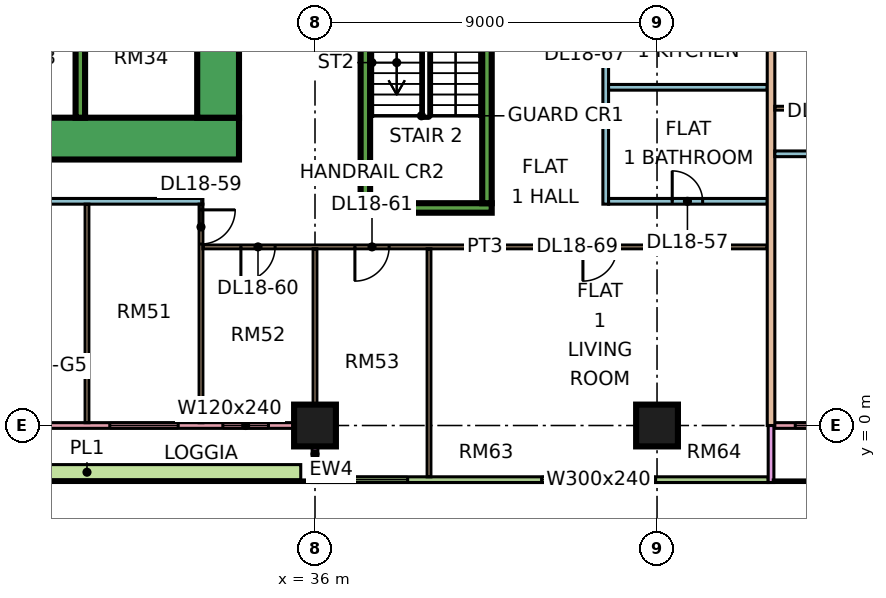
"""IFC4 building model, lengths in metres.
Left out: names, types, materials, properties, quantities, classifications, styles, units other than length and angle.
Written with IfcOpenShell. Run it as: python <this file> out.ifc"""

import sys

from ifc_helpers import new_model, si_unit, direction, frame, frame_2d, origin, origin_2d, place, context, subcontext, project, spatial, rectangle, extrude, element, fill, save


model = new_model("IFC4")
c1 = context("Model", 3, precision=1e-05, world=origin(), true_north=direction((0.0, 1.0)))
c2 = subcontext(c1, "Body", "Model", "MODEL_VIEW")
j1 = project(units=[si_unit("LENGTHUNIT", "METRE"), si_unit("PLANEANGLEUNIT", "RADIAN")], contexts=[c1])
p1 = place(None, origin())
s1 = spatial("IfcSite", under=j1, at=p1, CompositionType="ELEMENT")
p2 = place(p1, origin())
s2 = spatial("IfcBuilding", under=s1, at=p2, CompositionType="ELEMENT")
p3 = place(p2, frame((0.0, 0.0, 82.65)))
s3 = spatial("IfcBuildingStorey", under=s2, at=p3, CompositionType="ELEMENT", Elevation=82.65)
for number, where, z_axis, x_axis in (
    (1, (36.0, 0.0, 0.0), (0.0, 0.0, 1.0), (1.0, 0.0, 0.0)),
    (2, (45.0, 0.0, 0.0), (0.0, 0.0, 1.0), (1.0, 0.0, 0.0)),
):
    element("IfcColumn", number, at=place(p3, frame(where, z_axis=z_axis, x_axis=x_axis)), inside=s3, PredefinedType="COLUMN", context=c2, shape_type="SweptSolid", body=[
        extrude(rectangle(XDim=1.1, YDim=1.1, at=origin_2d()), origin(), (0.0, 0.0, 1.0), 3.75),
    ])
p4 = place(p3, frame((9.0, 7.55, 0.0), z_axis=(0.0, 0.0, 1.0), x_axis=(1.0, 0.0, 0.0)))
e3 = element("IfcWall", 3, at=p4, inside=s3, PredefinedType="SHEAR", context=c2, shape_type="SweptSolid", body=[
    extrude(rectangle(XDim=25.0, YDim=1.1, at=frame_2d((12.5, 0.0))), origin(), (0.0, 0.0, 1.0), 3.75),
])
p5 = place(p3, frame((33.45, 8.1, 0.0), z_axis=(0.0, 0.0, 1.0), x_axis=(0.0, 1.0, 0.0)))
e4 = element("IfcWall", 4, at=p5, inside=s3, PredefinedType="SHEAR", context=c2, shape_type="SweptSolid", body=[
    extrude(rectangle(XDim=10.8, YDim=1.1, at=frame_2d((5.4, 0.0))), origin(), (0.0, 0.0, 1.0), 3.75),
])
p6 = place(p5, frame((5.1, 0.0, 0.0)))
e5 = element("IfcOpeningElement", 5, at=p6, cuts=e4, PredefinedType="OPENING", context=c2, shape_type="SweptSolid", body=[
    extrude(rectangle(XDim=1.8, YDim=2.4, at=frame_2d((0.9, 1.2))), frame((0.0, 0.56, 0.0), z_axis=(0.0, -1.0, 0.0), x_axis=(1.0, 0.0, 0.0)), (0.0, 0.0, 1.0), 1.12),
])
p7 = place(p3, frame((29.825, 8.1, 0.0), z_axis=(0.0, 0.0, 1.0), x_axis=(0.0, 1.0, 0.0)))
e6 = element("IfcWall", 6, at=p7, inside=s3, PredefinedType="SHEAR", context=c2, shape_type="SweptSolid", body=[
    extrude(rectangle(XDim=3.1, YDim=0.25, at=frame_2d((1.55, 0.0))), origin(), (0.0, 0.0, 1.0), 3.75),
])
p8 = place(p3, frame((37.2, 5.725, 0.0), z_axis=(0.0, 0.0, 1.0), x_axis=(1.0, 0.0, 0.0)))
e7 = element("IfcWall", 7, at=p8, inside=s3, PredefinedType="SHEAR", context=c2, shape_type="SweptSolid", body=[
    extrude(rectangle(XDim=3.45, YDim=0.25, at=frame_2d((1.725, 0.0))), origin(), (0.0, 0.0, 1.0), 3.75),
])
for number, where, z_axis, x_axis in (
    (8, (37.325, 5.85, 0.0), (0.0, 0.0, 1.0), (0.0, 1.0, 0.0)),
    (9, (40.525, 5.85, 0.0), (0.0, 0.0, 1.0), (0.0, 1.0, 0.0)),
):
    element("IfcWall", number, at=place(p3, frame(where, z_axis=z_axis, x_axis=x_axis)), inside=s3, PredefinedType="SHEAR", context=c2, shape_type="SweptSolid", body=[
        extrude(rectangle(XDim=6.5, YDim=0.25, at=frame_2d((3.25, 0.0))), origin(), (0.0, 0.0, 1.0), 3.75),
    ])
p9 = place(p3, frame((24.075, 0.0, 0.0), z_axis=(0.0, 0.0, 1.0), x_axis=(1.0, 0.0, 0.0)))
e10 = element("IfcWall", 10, at=p9, inside=s3, PredefinedType="SOLIDWALL", context=c2, shape_type="SweptSolid", body=[
    extrude(rectangle(XDim=11.85, YDim=0.15, at=frame_2d((5.925, 0.0))), origin(), (0.0, 0.0, 1.0), 3.3),
])
p10 = place(p9, frame((2.35, 0.0, 0.0)))
e11 = element("IfcOpeningElement", 11, at=p10, cuts=e10, PredefinedType="OPENING", context=c2, shape_type="SweptSolid", body=[
    extrude(rectangle(XDim=1.8, YDim=2.4, at=frame_2d((0.9, 1.2))), frame((0.0, 0.085, 0.0), z_axis=(0.0, -1.0, 0.0), x_axis=(1.0, 0.0, 0.0)), (0.0, 0.0, 1.0), 0.17),
])
p11 = place(p9, frame((6.525, 0.0, 0.45)))
e12 = element("IfcOpeningElement", 12, at=p11, cuts=e10, PredefinedType="OPENING", context=c2, shape_type="SweptSolid", body=[
    extrude(rectangle(XDim=1.8, YDim=2.4, at=frame_2d((0.9, 1.2))), frame((0.0, 0.085, 0.0), z_axis=(0.0, -1.0, 0.0), x_axis=(1.0, 0.0, 0.0)), (0.0, 0.0, 1.0), 0.17),
])
p12 = place(p9, frame((9.5, 0.0, 0.45)))
e13 = element("IfcOpeningElement", 13, at=p12, cuts=e10, PredefinedType="OPENING", context=c2, shape_type="SweptSolid", body=[
    extrude(rectangle(XDim=1.2, YDim=2.4, at=frame_2d((0.6, 1.2))), frame((0.0, 0.085, 0.0), z_axis=(0.0, -1.0, 0.0), x_axis=(1.0, 0.0, 0.0)), (0.0, 0.0, 1.0), 0.17),
])
p13 = place(p3, frame((36.0, -1.5, 0.0), z_axis=(0.0, 0.0, 1.0), x_axis=(0.0, 1.0, 0.0)))
e14 = element("IfcWall", 14, at=p13, inside=s3, PredefinedType="SOLIDWALL", context=c2, shape_type="SweptSolid", body=[
    extrude(rectangle(XDim=1.5, YDim=0.15, at=frame_2d((0.75, 0.0))), origin(), (0.0, 0.0, 1.0), 3.3),
])
p14 = place(p3, frame((36.075, -1.425, 0.0), z_axis=(0.0, 0.0, 1.0), x_axis=(1.0, 0.0, 0.0)))
e15 = element("IfcWall", 15, at=p14, inside=s3, PredefinedType="SOLIDWALL", context=c2, shape_type="SweptSolid", body=[
    extrude(rectangle(XDim=11.85, YDim=0.15, at=frame_2d((5.925, 0.0))), origin(), (0.0, 0.0, 1.0), 3.3),
])
p15 = place(p14, frame((0.562, 0.0, 0.45)))
e16 = element("IfcOpeningElement", 16, at=p15, cuts=e15, PredefinedType="OPENING", context=c2, shape_type="SweptSolid", body=[
    extrude(rectangle(XDim=1.8, YDim=2.4, at=frame_2d((0.9, 1.2))), frame((0.0, 0.085, 0.0), z_axis=(0.0, -1.0, 0.0), x_axis=(1.0, 0.0, 0.0)), (0.0, 0.0, 1.0), 0.17),
])
p16 = place(p14, frame((5.887, 0.0, 0.45)))
e17 = element("IfcOpeningElement", 17, at=p16, cuts=e15, PredefinedType="OPENING", context=c2, shape_type="SweptSolid", body=[
    extrude(rectangle(XDim=3.0, YDim=2.4, at=frame_2d((1.5, 1.2))), frame((0.0, 0.085, 0.0), z_axis=(0.0, -1.0, 0.0), x_axis=(1.0, 0.0, 0.0)), (0.0, 0.0, 1.0), 0.17),
])
p17 = place(p3, frame((48.075, 0.0, 0.0), z_axis=(0.0, 0.0, 1.0), x_axis=(1.0, 0.0, 0.0)))
e18 = element("IfcWall", 18, at=p17, inside=s3, PredefinedType="SOLIDWALL", context=c2, shape_type="SweptSolid", body=[
    extrude(rectangle(XDim=11.85, YDim=0.15, at=frame_2d((5.925, 0.0))), origin(), (0.0, 0.0, 1.0), 3.3),
])
p18 = place(p17, frame((0.562, 0.0, 0.45)))
e19 = element("IfcOpeningElement", 19, at=p18, cuts=e18, PredefinedType="OPENING", context=c2, shape_type="SweptSolid", body=[
    extrude(rectangle(XDim=1.8, YDim=2.4, at=frame_2d((0.9, 1.2))), frame((0.0, 0.085, 0.0), z_axis=(0.0, -1.0, 0.0), x_axis=(1.0, 0.0, 0.0)), (0.0, 0.0, 1.0), 0.17),
])
p19 = place(p17, frame((3.5, 0.0, 0.45)))
e20 = element("IfcOpeningElement", 20, at=p19, cuts=e18, PredefinedType="OPENING", context=c2, shape_type="SweptSolid", body=[
    extrude(rectangle(XDim=1.2, YDim=2.4, at=frame_2d((0.6, 1.2))), frame((0.0, 0.085, 0.0), z_axis=(0.0, -1.0, 0.0), x_axis=(1.0, 0.0, 0.0)), (0.0, 0.0, 1.0), 0.17),
])
p20 = place(p17, frame((7.15, 0.0, 0.45)))
e21 = element("IfcOpeningElement", 21, at=p20, cuts=e18, PredefinedType="OPENING", context=c2, shape_type="SweptSolid", body=[
    extrude(rectangle(XDim=1.2, YDim=2.4, at=frame_2d((0.6, 1.2))), frame((0.0, 0.085, 0.0), z_axis=(0.0, -1.0, 0.0), x_axis=(1.0, 0.0, 0.0)), (0.0, 0.0, 1.0), 0.17),
])
p21 = place(p17, frame((9.488, 0.0, 0.45)))
e22 = element("IfcOpeningElement", 22, at=p21, cuts=e18, PredefinedType="OPENING", context=c2, shape_type="SweptSolid", body=[
    extrude(rectangle(XDim=1.8, YDim=2.4, at=frame_2d((0.9, 1.2))), frame((0.0, 0.085, 0.0), z_axis=(0.0, -1.0, 0.0), x_axis=(1.0, 0.0, 0.0)), (0.0, 0.0, 1.0), 0.17),
])
p22 = place(p3, frame((48.0, -1.5, 0.0), z_axis=(0.0, 0.0, 1.0), x_axis=(0.0, 1.0, 0.0)))
e23 = element("IfcWall", 23, at=p22, inside=s3, PredefinedType="SOLIDWALL", context=c2, shape_type="SweptSolid", body=[
    extrude(rectangle(XDim=1.5, YDim=0.15, at=frame_2d((0.75, 0.0))), origin(), (0.0, 0.0, 1.0), 3.3),
])
p23 = place(p3, frame((24.375, -1.229, 0.0), z_axis=(0.0, 0.0, 1.0), x_axis=(1.0, 0.0, 0.0)))
e24 = element("IfcWall", 24, at=p23, inside=s3, PredefinedType="SOLIDWALL", context=c2, shape_type="SweptSolid", body=[
    extrude(rectangle(XDim=11.25, YDim=0.4, at=frame_2d((5.625, 0.0))), origin(), (0.0, 0.0, 1.0), 0.7),
])
p24 = place(p3, frame((11.95, 5.9, 0.0), z_axis=(0.0, 0.0, 1.0), x_axis=(1.0, 0.0, 0.0)))
e25 = element("IfcWall", 25, at=p24, inside=s3, PredefinedType="PARTITIONING", context=c2, shape_type="SweptSolid", body=[
    extrude(rectangle(XDim=21.1, YDim=0.15, at=frame_2d((10.55, 0.0))), origin(), (0.0, 0.0, 1.0), 3.3),
])
p25 = place(p24, frame((1.1, 0.0, 0.0)))
e26 = element("IfcOpeningElement", 26, at=p25, cuts=e25, PredefinedType="OPENING", context=c2, shape_type="SweptSolid", body=[
    extrude(rectangle(XDim=0.9, YDim=2.1, at=frame_2d((0.45, 1.05))), frame((0.0, 0.085, 0.0), z_axis=(0.0, -1.0, 0.0), x_axis=(1.0, 0.0, 0.0)), (0.0, 0.0, 1.0), 0.17),
])
p26 = place(p24, frame((7.1, 0.0, 0.0)))
e27 = element("IfcOpeningElement", 27, at=p26, cuts=e25, PredefinedType="OPENING", context=c2, shape_type="SweptSolid", body=[
    extrude(rectangle(XDim=0.9, YDim=2.1, at=frame_2d((0.45, 1.05))), frame((0.0, 0.085, 0.0), z_axis=(0.0, -1.0, 0.0), x_axis=(1.0, 0.0, 0.0)), (0.0, 0.0, 1.0), 0.17),
])
p27 = place(p24, frame((13.1, 0.0, 0.0)))
e28 = element("IfcOpeningElement", 28, at=p27, cuts=e25, PredefinedType="OPENING", context=c2, shape_type="SweptSolid", body=[
    extrude(rectangle(XDim=0.9, YDim=2.1, at=frame_2d((0.45, 1.05))), frame((0.0, 0.085, 0.0), z_axis=(0.0, -1.0, 0.0), x_axis=(1.0, 0.0, 0.0)), (0.0, 0.0, 1.0), 0.17),
])
p28 = place(p3, frame((30.0, 0.074, 0.0), z_axis=(0.0, 0.0, 1.0), x_axis=(0.0, 1.0, 0.0)))
e29 = element("IfcWall", 29, at=p28, inside=s3, PredefinedType="PARTITIONING", context=c2, shape_type="SweptSolid", body=[
    extrude(rectangle(XDim=5.751, YDim=0.1, at=frame_2d((2.875, 0.0))), origin(), (0.0, 0.0, 1.0), 3.3),
])
p29 = place(p3, frame((33.0, 0.074, 0.0), z_axis=(0.0, 0.0, 1.0), x_axis=(0.0, 1.0, 0.0)))
e30 = element("IfcWall", 30, at=p29, inside=s3, PredefinedType="PARTITIONING", context=c2, shape_type="SweptSolid", body=[
    extrude(rectangle(XDim=5.751, YDim=0.1, at=frame_2d((2.875, 0.0))), origin(), (0.0, 0.0, 1.0), 3.3),
])
p30 = place(p29, frame((4.701, 0.0, 0.0)))
e31 = element("IfcOpeningElement", 31, at=p30, cuts=e30, PredefinedType="OPENING", context=c2, shape_type="SweptSolid", body=[
    extrude(rectangle(XDim=0.9, YDim=2.1, at=frame_2d((0.45, 1.05))), frame((0.0, 0.06, 0.0), z_axis=(0.0, -1.0, 0.0), x_axis=(1.0, 0.0, 0.0)), (0.0, 0.0, 1.0), 0.12),
])
p31 = place(p3, frame((33.05, 4.7, 0.0), z_axis=(0.0, 0.0, 1.0), x_axis=(1.0, 0.0, 0.0)))
e32 = element("IfcWall", 32, at=p31, inside=s3, PredefinedType="PARTITIONING", context=c2, shape_type="SweptSolid", body=[
    extrude(rectangle(XDim=14.85, YDim=0.1, at=frame_2d((7.425, 0.0))), origin(), (0.0, 0.0, 1.0), 3.3),
])
p32 = place(p31, frame((1.0, 0.0, 0.0)))
e33 = element("IfcOpeningElement", 33, at=p32, cuts=e32, PredefinedType="OPENING", context=c2, shape_type="SweptSolid", body=[
    extrude(rectangle(XDim=0.9, YDim=2.1, at=frame_2d((0.45, 1.05))), frame((0.0, 0.06, 0.0), z_axis=(0.0, -1.0, 0.0), x_axis=(1.0, 0.0, 0.0)), (0.0, 0.0, 1.0), 0.12),
])
p33 = place(p31, frame((4.0, 0.0, 0.0)))
e34 = element("IfcOpeningElement", 34, at=p33, cuts=e32, PredefinedType="OPENING", context=c2, shape_type="SweptSolid", body=[
    extrude(rectangle(XDim=0.9, YDim=2.1, at=frame_2d((0.45, 1.05))), frame((0.0, 0.06, 0.0), z_axis=(0.0, -1.0, 0.0), x_axis=(1.0, 0.0, 0.0)), (0.0, 0.0, 1.0), 0.12),
])
p34 = place(p31, frame((10.0, 0.0, 0.0)))
e35 = element("IfcOpeningElement", 35, at=p34, cuts=e32, PredefinedType="OPENING", context=c2, shape_type="SweptSolid", body=[
    extrude(rectangle(XDim=0.9, YDim=2.1, at=frame_2d((0.45, 1.05))), frame((0.0, 0.06, 0.0), z_axis=(0.0, -1.0, 0.0), x_axis=(1.0, 0.0, 0.0)), (0.0, 0.0, 1.0), 0.12),
])
p35 = place(p3, frame((36.0, 0.0, 0.0), z_axis=(0.0, 0.0, 1.0), x_axis=(0.0, 1.0, 0.0)))
e36 = element("IfcWall", 36, at=p35, inside=s3, PredefinedType="PARTITIONING", context=c2, shape_type="SweptSolid", body=[
    extrude(rectangle(XDim=4.65, YDim=0.1, at=frame_2d((2.325, 0.0))), origin(), (0.0, 0.0, 1.0), 3.3),
])
p36 = place(p3, frame((39.0, -1.35, 0.0), z_axis=(0.0, 0.0, 1.0), x_axis=(0.0, 1.0, 0.0)))
e37 = element("IfcWall", 37, at=p36, inside=s3, PredefinedType="PARTITIONING", context=c2, shape_type="SweptSolid", body=[
    extrude(rectangle(XDim=6.0, YDim=0.1, at=frame_2d((3.0, 0.0))), origin(), (0.0, 0.0, 1.0), 3.3),
])
p37 = place(p3, frame((43.65, 5.825, 0.0), z_axis=(0.0, 0.0, 1.0), x_axis=(0.0, 1.0, 0.0)))
e38 = element("IfcWall", 38, at=p37, inside=s3, PredefinedType="PARTITIONING", context=c2, shape_type="SweptSolid", body=[
    extrude(rectangle(XDim=6.625, YDim=0.15, at=frame_2d((3.312, 0.0))), origin(), (0.0, 0.0, 1.0), 3.3),
])
p38 = place(p37, frame((4.425, 0.0, 0.0)))
e39 = element("IfcOpeningElement", 39, at=p38, cuts=e38, PredefinedType="OPENING", context=c2, shape_type="SweptSolid", body=[
    extrude(rectangle(XDim=0.9, YDim=2.1, at=frame_2d((0.45, 1.05))), frame((0.0, 0.085, 0.0), z_axis=(0.0, -1.0, 0.0), x_axis=(1.0, 0.0, 0.0)), (0.0, 0.0, 1.0), 0.17),
])
p39 = place(p3, frame((43.725, 5.9, 0.0), z_axis=(0.0, 0.0, 1.0), x_axis=(1.0, 0.0, 0.0)))
e40 = element("IfcWall", 40, at=p39, inside=s3, PredefinedType="PARTITIONING", context=c2, shape_type="SweptSolid", body=[
    extrude(rectangle(XDim=4.175, YDim=0.15, at=frame_2d((2.087, 0.0))), origin(), (0.0, 0.0, 1.0), 3.3),
])
p40 = place(p39, frame((1.675, 0.0, 0.0)))
e41 = element("IfcOpeningElement", 41, at=p40, cuts=e40, PredefinedType="OPENING", context=c2, shape_type="SweptSolid", body=[
    extrude(rectangle(XDim=0.8, YDim=2.1, at=frame_2d((0.4, 1.05))), frame((0.0, 0.085, 0.0), z_axis=(0.0, -1.0, 0.0), x_axis=(1.0, 0.0, 0.0)), (0.0, 0.0, 1.0), 0.17),
])
p41 = place(p3, frame((43.725, 8.9, 0.0), z_axis=(0.0, 0.0, 1.0), x_axis=(1.0, 0.0, 0.0)))
e42 = element("IfcWall", 42, at=p41, inside=s3, PredefinedType="PARTITIONING", context=c2, shape_type="SweptSolid", body=[
    extrude(rectangle(XDim=4.175, YDim=0.15, at=frame_2d((2.087, 0.0))), origin(), (0.0, 0.0, 1.0), 3.3),
])
p42 = place(p3, frame((48.0, 0.0, 0.0), z_axis=(0.0, 0.0, 1.0), x_axis=(0.0, 1.0, 0.0)))
e43 = element("IfcWall", 43, at=p42, inside=s3, PredefinedType="PARTITIONING", context=c2, shape_type="SweptSolid", body=[
    extrude(rectangle(XDim=12.45, YDim=0.2, at=frame_2d((6.225, 0.0))), origin(), (0.0, 0.0, 1.0), 3.3),
])
p43 = place(p3, frame((48.1, 7.15, 0.0), z_axis=(0.0, 0.0, 1.0), x_axis=(1.0, 0.0, 0.0)))
e44 = element("IfcWall", 44, at=p43, inside=s3, PredefinedType="PARTITIONING", context=c2, shape_type="SweptSolid", body=[
    extrude(rectangle(XDim=23.826, YDim=0.15, at=frame_2d((11.913, 0.0))), origin(), (0.0, 0.0, 1.0), 3.3),
])
p44 = place(p43, frame((0.95, 0.0, 0.0)))
e45 = element("IfcOpeningElement", 45, at=p44, cuts=e44, PredefinedType="OPENING", context=c2, shape_type="SweptSolid", body=[
    extrude(rectangle(XDim=0.9, YDim=2.1, at=frame_2d((0.45, 1.05))), frame((0.0, 0.085, 0.0), z_axis=(0.0, -1.0, 0.0), x_axis=(1.0, 0.0, 0.0)), (0.0, 0.0, 1.0), 0.17),
])
p45 = place(p43, frame((6.95, 0.0, 0.0)))
e46 = element("IfcOpeningElement", 46, at=p45, cuts=e44, PredefinedType="OPENING", context=c2, shape_type="SweptSolid", body=[
    extrude(rectangle(XDim=0.9, YDim=2.1, at=frame_2d((0.45, 1.05))), frame((0.0, 0.085, 0.0), z_axis=(0.0, -1.0, 0.0), x_axis=(1.0, 0.0, 0.0)), (0.0, 0.0, 1.0), 0.17),
])
p46 = place(p43, frame((21.95, 0.0, 0.0)))
e47 = element("IfcOpeningElement", 47, at=p46, cuts=e44, PredefinedType="OPENING", context=c2, shape_type="SweptSolid", body=[
    extrude(rectangle(XDim=0.9, YDim=2.1, at=frame_2d((0.45, 1.05))), frame((0.0, 0.085, 0.0), z_axis=(0.0, -1.0, 0.0), x_axis=(1.0, 0.0, 0.0)), (0.0, 0.0, 1.0), 0.17),
])
p47 = place(p43, frame((14.45, 0.0, 0.0)))
e48 = element("IfcOpeningElement", 48, at=p47, cuts=e44, PredefinedType="OPENING", context=c2, shape_type="SweptSolid", body=[
    extrude(rectangle(XDim=0.9, YDim=2.1, at=frame_2d((0.45, 1.05))), frame((0.0, 0.085, 0.0), z_axis=(0.0, -1.0, 0.0), x_axis=(1.0, 0.0, 0.0)), (0.0, 0.0, 1.0), 0.17),
])
p48 = place(p43, frame((19.8, 0.0, 0.0)))
e49 = element("IfcOpeningElement", 49, at=p48, cuts=e44, PredefinedType="OPENING", context=c2, shape_type="SweptSolid", body=[
    extrude(rectangle(XDim=0.8, YDim=2.1, at=frame_2d((0.4, 1.05))), frame((0.0, 0.085, 0.0), z_axis=(0.0, -1.0, 0.0), x_axis=(1.0, 0.0, 0.0)), (0.0, 0.0, 1.0), 0.17),
])
p49 = place(p43, frame((3.65, 0.0, 0.0)))
e50 = element("IfcOpeningElement", 50, at=p49, cuts=e44, PredefinedType="OPENING", context=c2, shape_type="SweptSolid", body=[
    extrude(rectangle(XDim=1.6, YDim=2.1, at=frame_2d((0.8, 1.05))), frame((0.0, 0.085, 0.0), z_axis=(0.0, -1.0, 0.0), x_axis=(1.0, 0.0, 0.0)), (0.0, 0.0, 1.0), 0.17),
])
p50 = place(p43, frame((9.95, 0.0, 0.0)))
e51 = element("IfcOpeningElement", 51, at=p50, cuts=e44, PredefinedType="OPENING", context=c2, shape_type="SweptSolid", body=[
    extrude(rectangle(XDim=0.9, YDim=2.1, at=frame_2d((0.45, 1.05))), frame((0.0, 0.085, 0.0), z_axis=(0.0, -1.0, 0.0), x_axis=(1.0, 0.0, 0.0)), (0.0, 0.0, 1.0), 0.17),
])
p51 = place(p3, frame((48.1, 8.35, 0.0), z_axis=(0.0, 0.0, 1.0), x_axis=(1.0, 0.0, 0.0)))
e52 = element("IfcWall", 52, at=p51, inside=s3, PredefinedType="PARTITIONING", context=c2, shape_type="SweptSolid", body=[
    extrude(rectangle(XDim=3.45, YDim=0.1, at=frame_2d((1.725, 0.0))), origin(), (0.0, 0.0, 1.0), 3.3),
])
p52 = place(p11, origin())
e53 = element("IfcWindow", 53, at=p52, inside=s3, PartitioningType="SINGLE_PANEL", PredefinedType="WINDOW", context=c2, shape_type="SweptSolid", body=[
    extrude(rectangle(XDim=1.8, YDim=2.4, at=frame_2d((0.9, 1.2))), frame((0.0, 0.03, 0.0), z_axis=(0.0, -1.0, 0.0), x_axis=(1.0, 0.0, 0.0)), (0.0, 0.0, 1.0), 0.06),
])
fill(e12, e53)
p53 = place(p12, origin())
e54 = element("IfcWindow", 54, at=p53, inside=s3, PartitioningType="SINGLE_PANEL", PredefinedType="WINDOW", context=c2, shape_type="SweptSolid", body=[
    extrude(rectangle(XDim=1.2, YDim=2.4, at=frame_2d((0.6, 1.2))), frame((0.0, 0.03, 0.0), z_axis=(0.0, -1.0, 0.0), x_axis=(1.0, 0.0, 0.0)), (0.0, 0.0, 1.0), 0.06),
])
fill(e13, e54)
p54 = place(p15, origin())
e55 = element("IfcWindow", 55, at=p54, inside=s3, PartitioningType="SINGLE_PANEL", PredefinedType="WINDOW", context=c2, shape_type="SweptSolid", body=[
    extrude(rectangle(XDim=1.8, YDim=2.4, at=frame_2d((0.9, 1.2))), frame((0.0, 0.03, 0.0), z_axis=(0.0, -1.0, 0.0), x_axis=(1.0, 0.0, 0.0)), (0.0, 0.0, 1.0), 0.06),
])
fill(e16, e55)
p55 = place(p16, origin())
e56 = element("IfcWindow", 56, at=p55, inside=s3, PartitioningType="SINGLE_PANEL", PredefinedType="WINDOW", context=c2, shape_type="SweptSolid", body=[
    extrude(rectangle(XDim=3.0, YDim=2.4, at=frame_2d((1.5, 1.2))), frame((0.0, 0.03, 0.0), z_axis=(0.0, -1.0, 0.0), x_axis=(1.0, 0.0, 0.0)), (0.0, 0.0, 1.0), 0.06),
])
fill(e17, e56)
p56 = place(p18, origin())
e57 = element("IfcWindow", 57, at=p56, inside=s3, PartitioningType="SINGLE_PANEL", PredefinedType="WINDOW", context=c2, shape_type="SweptSolid", body=[
    extrude(rectangle(XDim=1.8, YDim=2.4, at=frame_2d((0.9, 1.2))), frame((0.0, 0.03, 0.0), z_axis=(0.0, -1.0, 0.0), x_axis=(1.0, 0.0, 0.0)), (0.0, 0.0, 1.0), 0.06),
])
fill(e19, e57)
p57 = place(p40, origin())
e58 = element("IfcDoor", 58, at=p57, inside=s3, OperationType="SINGLE_SWING_LEFT", PredefinedType="DOOR", context=c2, shape_type="SweptSolid", body=[
    extrude(rectangle(XDim=0.8, YDim=2.1, at=frame_2d((0.4, 1.05))), frame((0.0, 0.025, 0.0), z_axis=(0.0, -1.0, 0.0), x_axis=(1.0, 0.0, 0.0)), (0.0, 0.0, 1.0), 0.05),
])
fill(e41, e58)
p58 = place(p30, origin())
e59 = element("IfcDoor", 59, at=p58, inside=s3, OperationType="SINGLE_SWING_RIGHT", PredefinedType="DOOR", context=c2, shape_type="SweptSolid", body=[
    extrude(rectangle(XDim=0.9, YDim=2.1, at=frame_2d((0.45, 1.05))), frame((0.0, 0.025, 0.0), z_axis=(0.0, -1.0, 0.0), x_axis=(1.0, 0.0, 0.0)), (0.0, 0.0, 1.0), 0.05),
])
fill(e31, e59)
p59 = place(p32, frame((0.9, 0.0, 0.0), z_axis=(0.0, 0.0, 1.0), x_axis=(-1.0, 0.0, 0.0)))
e60 = element("IfcDoor", 60, at=p59, inside=s3, OperationType="SINGLE_SWING_LEFT", PredefinedType="DOOR", context=c2, shape_type="SweptSolid", body=[
    extrude(rectangle(XDim=0.9, YDim=2.1, at=frame_2d((0.45, 1.05))), frame((0.0, 0.025, 0.0), z_axis=(0.0, -1.0, 0.0), x_axis=(1.0, 0.0, 0.0)), (0.0, 0.0, 1.0), 0.05),
])
fill(e33, e60)
p60 = place(p33, frame((0.9, 0.0, 0.0), z_axis=(0.0, 0.0, 1.0), x_axis=(-1.0, 0.0, 0.0)))
e61 = element("IfcDoor", 61, at=p60, inside=s3, OperationType="SINGLE_SWING_LEFT", PredefinedType="DOOR", context=c2, shape_type="SweptSolid", body=[
    extrude(rectangle(XDim=0.9, YDim=2.1, at=frame_2d((0.45, 1.05))), frame((0.0, 0.025, 0.0), z_axis=(0.0, -1.0, 0.0), x_axis=(1.0, 0.0, 0.0)), (0.0, 0.0, 1.0), 0.05),
])
fill(e34, e61)
p61 = place(p34, frame((0.9, 0.0, 0.0), z_axis=(0.0, 0.0, 1.0), x_axis=(-1.0, 0.0, 0.0)))
e62 = element("IfcDoor", 62, at=p61, inside=s3, OperationType="SINGLE_SWING_LEFT", PredefinedType="DOOR", context=c2, shape_type="SweptSolid", body=[
    extrude(rectangle(XDim=0.9, YDim=2.1, at=frame_2d((0.45, 1.05))), frame((0.0, 0.025, 0.0), z_axis=(0.0, -1.0, 0.0), x_axis=(1.0, 0.0, 0.0)), (0.0, 0.0, 1.0), 0.05),
])
fill(e35, e62)
save(model, sys.argv[1])
